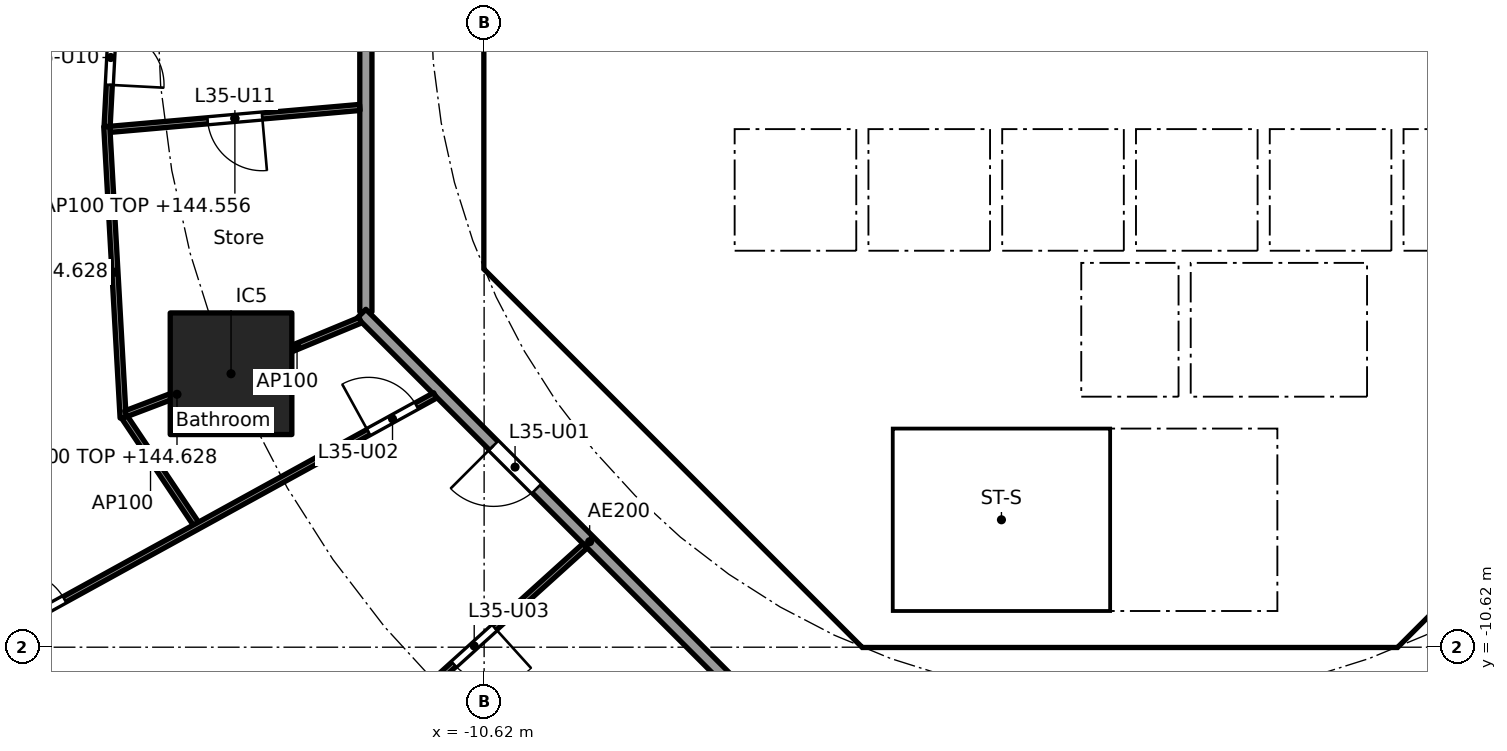
"""IFC4 building model, lengths in metres.
Left out: names, types, materials, properties, quantities, classifications, styles, units other than length and angle.
Written with IfcOpenShell. Run it as: python <this file> out.ifc"""

import sys

from ifc_helpers import new_model, si_unit, direction, frame, frame_2d, origin, origin_2d, place, context, subcontext, project, spatial, polyline, rectangle, outline, extrude, element, fill, save


model = new_model("IFC4")
c1 = context("Model", 3, precision=1e-05, world=origin(), true_north=direction((0.0, 1.0)))
c2 = subcontext(c1, "Body", "Model", "MODEL_VIEW")
j1 = project(units=[si_unit("LENGTHUNIT", "METRE"), si_unit("PLANEANGLEUNIT", "RADIAN")], contexts=[c1])
p1 = place(None, origin())
s1 = spatial("IfcSite", under=j1, at=p1, CompositionType="ELEMENT")
p2 = place(p1, origin())
s2 = spatial("IfcBuilding", under=s1, at=p2, CompositionType="ELEMENT")
p3 = place(p2, frame((0.0, 0.0, 141.8)))
s3 = spatial("IfcBuildingStorey", under=s2, at=p3, CompositionType="ELEMENT", Elevation=141.8)
p4 = place(p3, frame((-14.782, -6.123, 0.0), z_axis=(0.0, 0.0, 1.0), x_axis=(1.0, 0.0, 0.0)))
e1 = element("IfcColumn", 1, at=p4, inside=s3, PredefinedType="COLUMN", context=c2, shape_type="SweptSolid", body=[
    extrude(rectangle(XDim=2.0, YDim=2.0, at=origin_2d()), origin(), (0.0, 0.0, 1.0), 3.7),
])
p5 = place(p3, frame((-10.325, 3.801, 0.0), z_axis=(0.0, 0.0, 1.0), x_axis=(0.0, -1.0, 0.0)))
e2 = element("IfcWall", 2, at=p5, inside=s3, PredefinedType="SHEAR", context=c2, shape_type="SweptSolid", body=[
    extrude(rectangle(XDim=7.602, YDim=0.6, at=frame_2d((3.801, 0.0))), origin(), (0.0, 0.0, 1.0), 3.44),
])
p6 = place(p5, frame((0.651, 0.0, 0.0)))
e3 = element("IfcOpeningElement", 3, at=p6, cuts=e2, PredefinedType="OPENING", context=c2, shape_type="SweptSolid", body=[
    extrude(rectangle(XDim=1.5, YDim=2.1, at=frame_2d((0.75, 1.05))), frame((0.0, 0.31, 0.0), z_axis=(0.0, -1.0, 0.0), x_axis=(1.0, 0.0, 0.0)), (0.0, 0.0, 1.0), 0.62),
])
p7 = place(p5, frame((5.451, 0.0, 0.0)))
e4 = element("IfcOpeningElement", 4, at=p7, cuts=e2, PredefinedType="OPENING", context=c2, shape_type="SweptSolid", body=[
    extrude(rectangle(XDim=1.5, YDim=2.1, at=frame_2d((0.75, 1.05))), frame((0.0, 0.31, 0.0), z_axis=(0.0, -1.0, 0.0), x_axis=(1.0, 0.0, 0.0)), (0.0, 0.0, 1.0), 0.62),
])
p8 = place(p3, frame((-9.988, -4.613, 0.0), z_axis=(0.0, 0.0, 1.0), x_axis=(0.707106781187, -0.707106781187, 0.0)))
e5 = element("IfcWall", 5, at=p8, inside=s3, PredefinedType="SHEAR", context=c2, shape_type="SweptSolid", body=[
    extrude(rectangle(XDim=7.602, YDim=0.6, at=frame_2d((3.801, 0.0))), origin(), (0.0, 0.0, 1.0), 3.44),
])
p9 = place(p8, frame((6.151, 0.0, 0.0)))
e6 = element("IfcOpeningElement", 6, at=p9, cuts=e5, PredefinedType="OPENING", context=c2, shape_type="SweptSolid", body=[
    extrude(rectangle(XDim=1.1, YDim=2.1, at=frame_2d((0.55, 1.05))), frame((0.0, 0.31, 0.0), z_axis=(0.0, -1.0, 0.0), x_axis=(1.0, 0.0, 0.0)), (0.0, 0.0, 1.0), 0.62),
])
p10 = place(p3, frame((4.613, -9.988, 0.0), z_axis=(0.0, 0.0, 1.0), x_axis=(0.707106781187, 0.707106781187, 0.0)))
e7 = element("IfcWall", 7, at=p10, inside=s3, PredefinedType="SHEAR", context=c2, shape_type="SweptSolid", body=[
    extrude(rectangle(XDim=7.602, YDim=0.6, at=frame_2d((3.801, 0.0))), origin(), (0.0, 0.0, 1.0), 3.44),
])
p11 = place(p10, frame((3.201, 0.0, 0.0)))
e8 = element("IfcOpeningElement", 8, at=p11, cuts=e7, PredefinedType="OPENING", context=c2, shape_type="SweptSolid", body=[
    extrude(rectangle(XDim=1.2, YDim=2.1, at=frame_2d((0.6, 1.05))), frame((0.0, 0.31, 0.0), z_axis=(0.0, -1.0, 0.0), x_axis=(1.0, 0.0, 0.0)), (0.0, 0.0, 1.0), 0.62),
])
p12 = place(p3, frame((4.0, -10.025, 0.0), z_axis=(0.0, 0.0, 1.0), x_axis=(0.0, 1.0, 0.0)))
e9 = element("IfcWall", 9, at=p12, inside=s3, PredefinedType="SOLIDWALL", context=c2, shape_type="SweptSolid", body=[
    extrude(rectangle(XDim=3.0, YDim=0.2, at=frame_2d((1.5, 0.0))), origin(), (0.0, 0.0, 1.0), 3.44),
])
p13 = place(p12, frame((0.975, 0.0, 0.0)))
e10 = element("IfcOpeningElement", 10, at=p13, cuts=e9, PredefinedType="OPENING", context=c2, shape_type="SweptSolid", body=[
    extrude(rectangle(XDim=1.1, YDim=2.1, at=frame_2d((0.55, 1.05))), frame((0.0, 0.11, 0.0), z_axis=(0.0, -1.0, 0.0), x_axis=(1.0, 0.0, 0.0)), (0.0, 0.0, 1.0), 0.22),
])
p14 = place(p3, frame((-7.0, -7.027, 0.0), z_axis=(0.0, 0.0, 1.0), x_axis=(0.0, 1.0, 0.0)))
e11 = element("IfcWall", 11, at=p14, inside=s3, PredefinedType="PARTITIONING", context=c2, shape_type="SweptSolid", body=[
    extrude(rectangle(XDim=2.927, YDim=0.15, at=frame_2d((1.463, 0.0))), origin(), (0.0, 0.0, 1.0), 3.44),
])
p15 = place(p14, frame((0.976, 0.0, 0.0)))
e12 = element("IfcOpeningElement", 12, at=p15, cuts=e11, PredefinedType="OPENING", context=c2, shape_type="SweptSolid", body=[
    extrude(rectangle(XDim=0.9, YDim=2.1, at=frame_2d((0.45, 1.05))), frame((0.0, 0.085, 0.0), z_axis=(0.0, -1.0, 0.0), x_axis=(1.0, 0.0, 0.0)), (0.0, 0.0, 1.0), 0.17),
])
p16 = place(p3, frame((4.0, -6.5, 0.0), z_axis=(0.0, 0.0, 1.0), x_axis=(0.0, 1.0, 0.0)))
e13 = element("IfcWall", 13, at=p16, inside=s3, PredefinedType="SOLIDWALL", context=c2, shape_type="SweptSolid", body=[
    extrude(rectangle(XDim=2.2, YDim=0.2, at=frame_2d((1.1, 0.0))), origin(), (0.0, 0.0, 1.0), 3.44),
])
p17 = place(p16, frame((0.55, 0.0, 0.0)))
e14 = element("IfcOpeningElement", 14, at=p17, cuts=e13, PredefinedType="OPENING", context=c2, shape_type="SweptSolid", body=[
    extrude(rectangle(XDim=1.1, YDim=2.1, at=frame_2d((0.55, 1.05))), frame((0.0, 0.11, 0.0), z_axis=(0.0, -1.0, 0.0), x_axis=(1.0, 0.0, 0.0)), (0.0, 0.0, 1.0), 0.22),
])
p18 = place(p3, frame((-4.0, -6.5, 0.0), z_axis=(0.0, 0.0, 1.0), x_axis=(0.0, 1.0, 0.0)))
e15 = element("IfcWall", 15, at=p18, inside=s3, PredefinedType="SOLIDWALL", context=c2, shape_type="SweptSolid", body=[
    extrude(rectangle(XDim=2.2, YDim=0.2, at=frame_2d((1.1, 0.0))), origin(), (0.0, 0.0, 1.0), 3.44),
])
p19 = place(p18, frame((0.65, 0.0, 0.0)))
e16 = element("IfcOpeningElement", 16, at=p19, cuts=e15, PredefinedType="OPENING", context=c2, shape_type="SweptSolid", body=[
    extrude(rectangle(XDim=0.9, YDim=2.1, at=frame_2d((0.45, 1.05))), frame((0.0, 0.11, 0.0), z_axis=(0.0, -1.0, 0.0), x_axis=(1.0, 0.0, 0.0)), (0.0, 0.0, 1.0), 0.22),
])
p20 = place(p3, frame((-6.7, -2.0, 0.0), z_axis=(0.0, 0.0, 1.0), x_axis=(1.0, 0.0, 0.0)))
e17 = element("IfcWall", 17, at=p20, inside=s3, PredefinedType="SOLIDWALL", context=c2, shape_type="SweptSolid", body=[
    extrude(rectangle(XDim=13.4, YDim=0.2, at=frame_2d((6.7, 0.0))), origin(), (0.0, 0.0, 1.0), 3.44),
])
p21 = place(p20, frame((0.65, 0.0, 0.0)))
e18 = element("IfcOpeningElement", 18, at=p21, cuts=e17, PredefinedType="OPENING", context=c2, shape_type="SweptSolid", body=[
    extrude(rectangle(XDim=1.1, YDim=2.1, at=frame_2d((0.55, 1.05))), frame((0.0, 0.11, 0.0), z_axis=(0.0, -1.0, 0.0), x_axis=(1.0, 0.0, 0.0)), (0.0, 0.0, 1.0), 0.22),
])
p22 = place(p20, frame((2.85, 0.0, 0.0)))
e19 = element("IfcOpeningElement", 19, at=p22, cuts=e17, PredefinedType="OPENING", context=c2, shape_type="SweptSolid", body=[
    extrude(rectangle(XDim=1.1, YDim=2.1, at=frame_2d((0.55, 1.05))), frame((0.0, 0.11, 0.0), z_axis=(0.0, -1.0, 0.0), x_axis=(1.0, 0.0, 0.0)), (0.0, 0.0, 1.0), 0.22),
])
p23 = place(p3, origin())
e20 = element("IfcWall", 20, at=p23, inside=s3, PredefinedType="SHEAR", context=c2, shape_type="SweptSolid", body=[
    extrude(outline(polyline([(-10.625, -3.801), (-10.025, -3.801), (-10.025, -4.152), (-9.776, -4.401), (-10.2, -4.825), (-10.625, -4.401), (-10.625, -3.801)])), origin(), (0.0, 0.0, 1.0), 3.44),
])
p24 = place(p3, origin())
e21 = element("IfcWall", 21, at=p24, inside=s3, PredefinedType="SHEAR", context=c2, shape_type="SweptSolid", body=[
    extrude(outline(polyline([(-4.152, -10.025), (4.152, -10.025), (4.401, -9.776), (4.825, -10.2), (4.401, -10.625), (-4.401, -10.625), (-4.825, -10.2), (-4.401, -9.776), (-4.152, -10.025)])), origin(), (0.0, 0.0, 1.0), 3.44),
])
p25 = place(p3, frame((-10.025, -4.0, 0.0), z_axis=(0.0, 0.0, 1.0), x_axis=(1.0, 0.0, 0.0)))
e22 = element("IfcWall", 22, at=p25, inside=s3, PredefinedType="PARTITIONING", context=c2, shape_type="SweptSolid", body=[
    extrude(rectangle(XDim=3.325, YDim=0.2, at=frame_2d((1.662, 0.0))), origin(), (0.0, 0.0, 1.0), 3.44),
])
for number, where, z_axis, x_axis in (
    (23, (-0.9, -6.5, 0.0), (0.0, 0.0, 1.0), (0.0, 1.0, 0.0)),
    (24, (0.9, -6.5, 0.0), (0.0, 0.0, 1.0), (0.0, 1.0, 0.0)),
):
    element("IfcWall", number, at=place(p3, frame(where, z_axis=z_axis, x_axis=x_axis)), inside=s3, PredefinedType="SOLIDWALL", context=c2, shape_type="SweptSolid", body=[
        extrude(rectangle(XDim=2.2, YDim=0.2, at=frame_2d((1.1, 0.0))), origin(), (0.0, 0.0, 1.0), 3.44),
    ])
p26 = place(p3, origin())
e25 = element("IfcWall", 25, at=p26, inside=s3, PredefinedType="SOLIDWALL", context=c2, shape_type="SweptSolid", body=[
    extrude(outline(polyline([(-6.7, -2.1), (-6.5, -2.1), (-6.5, -4.1), (-4.5, -4.1), (-4.5, -2.1), (-4.3, -2.1), (-4.3, -4.1), (-2.3, -4.1), (-2.3, -2.1), (-2.1, -2.1), (-2.1, -4.1), (-0.1, -4.1), (-0.1, -2.1), (0.1, -2.1), (0.1, -4.1), (2.1, -4.1), (2.1, -2.1), (2.3, -2.1), (2.3, -4.1), (4.3, -4.1), (4.3, -2.1), (4.5, -2.1), (4.5, -4.1), (6.5, -4.1), (6.5, -2.1), (6.7, -2.1), (6.7, -4.3), (-6.7, -4.3), (-6.7, -2.1)])), origin(), (0.0, 0.0, 1.0), 3.44),
])
p27 = place(p3, origin())
e26 = element("IfcWall", 26, at=p27, inside=s3, PredefinedType="SOLIDWALL", context=c2, shape_type="SweptSolid", body=[
    extrude(outline(polyline([(-3.9, -10.025), (-4.1, -10.025), (-4.1, -7.025), (-3.9, -7.025), (-3.9, -10.025)])), origin(), (0.0, 0.0, 1.0), 3.44),
])
p28 = place(p3, origin())
e27 = element("IfcWall", 27, at=p28, inside=s3, PredefinedType="SOLIDWALL", context=c2, shape_type="SweptSolid", body=[
    extrude(outline(polyline([(4.1, -7.025), (-4.1, -7.025), (-4.1, -6.5), (4.1, -6.5), (4.1, -7.025)])), origin(), (0.0, 0.0, 1.0), 3.44),
])
p29 = place(p3, frame((-12.565, 5.304, 0.0), z_axis=(0.0, 0.0, 1.0), x_axis=(0.0, -1.0, 0.0)))
e28 = element("IfcWall", 28, at=p29, inside=s3, PredefinedType="PARTITIONING", context=c2, shape_type="SweptSolid", body=[
    extrude(rectangle(XDim=10.409, YDim=0.2, at=frame_2d((5.205, 0.0))), origin(), (0.0, 0.0, 1.0), 3.44),
])
p30 = place(p3, frame((-12.635, -5.134, 0.0), z_axis=(0.0, 0.0, 1.0), x_axis=(0.707106781187, -0.707106781187, 0.0)))
e29 = element("IfcWall", 29, at=p30, inside=s3, PredefinedType="PARTITIONING", context=c2, shape_type="SweptSolid", body=[
    extrude(rectangle(XDim=10.609, YDim=0.2, at=frame_2d((5.305, 0.0))), origin(), (0.0, 0.0, 1.0), 3.44),
])
p31 = place(p30, frame((3.07, 0.0, 0.0)))
e30 = element("IfcOpeningElement", 30, at=p31, cuts=e29, PredefinedType="OPENING", context=c2, shape_type="SweptSolid", body=[
    extrude(rectangle(XDim=1.0, YDim=2.1, at=frame_2d((0.5, 1.05))), frame((0.0, 0.11, 0.0), z_axis=(0.0, -1.0, 0.0), x_axis=(1.0, 0.0, 0.0)), (0.0, 0.0, 1.0), 0.22),
])
p32 = place(p3, frame((-16.576, 2.585, 0.0), z_axis=(0.0, 0.0, 1.0), x_axis=(-0.052509224895, -0.998620439056, 0.0)))
e31 = element("IfcWall", 31, at=p32, inside=s3, PredefinedType="PARTITIONING", context=c2, shape_type="SweptSolid", body=[
    extrude(rectangle(XDim=4.649, YDim=0.1, at=frame_2d((2.325, 0.0))), origin(), (0.0, 0.0, 1.0), 2.828),
])
p33 = place(p32, frame((3.062, 0.0, 0.0)))
e32 = element("IfcOpeningElement", 32, at=p33, cuts=e31, PredefinedType="OPENING", context=c2, shape_type="SweptSolid", body=[
    extrude(rectangle(XDim=0.9, YDim=2.1, at=frame_2d((0.45, 1.05))), frame((0.0, 0.06, 0.0), z_axis=(0.0, -1.0, 0.0), x_axis=(1.0, 0.0, 0.0)), (0.0, 0.0, 1.0), 0.12),
])
p34 = place(p3, frame((-12.664, -1.744, 0.0), z_axis=(0.0, 0.0, 1.0), x_axis=(-0.996181049379, -0.08731160781, 0.0)))
e33 = element("IfcWall", 33, at=p34, inside=s3, PredefinedType="PARTITIONING", context=c2, shape_type="SweptSolid", body=[
    extrude(rectangle(XDim=4.125, YDim=0.1, at=frame_2d((2.062, 0.0))), origin(), (0.0, 0.0, 1.0), 2.756),
])
p35 = place(p34, frame((1.612, 0.0, 0.0)))
e34 = element("IfcOpeningElement", 34, at=p35, cuts=e33, PredefinedType="OPENING", context=c2, shape_type="SweptSolid", body=[
    extrude(rectangle(XDim=0.9, YDim=2.1, at=frame_2d((0.45, 1.05))), frame((0.0, 0.06, 0.0), z_axis=(0.0, -1.0, 0.0), x_axis=(1.0, 0.0, 0.0)), (0.0, 0.0, 1.0), 0.12),
])
p36 = place(p3, frame((-16.825, -2.058, 0.0), z_axis=(0.0, 0.0, 1.0), x_axis=(0.055971643802, -0.998432358796, 0.0)))
e35 = element("IfcWall", 35, at=p36, inside=s3, PredefinedType="PARTITIONING", context=c2, shape_type="SweptSolid", body=[
    extrude(rectangle(XDim=4.798, YDim=0.1, at=frame_2d((2.399, 0.0))), origin(), (0.0, 0.0, 1.0), 2.828),
])
p37 = place(p3, frame((-12.657, -5.243, 0.0), z_axis=(0.0, 0.0, 1.0), x_axis=(-0.923864733477, -0.382719158442, 0.0)))
e36 = element("IfcWall", 36, at=p37, inside=s3, PredefinedType="PARTITIONING", context=c2, shape_type="SweptSolid", body=[
    extrude(rectangle(XDim=2.25, YDim=0.1, at=frame_2d((1.125, 0.0))), origin(), (0.0, 0.0, 1.0), 3.44),
])
p38 = place(p3, frame((-14.829, -6.141, 0.0), z_axis=(0.0, 0.0, 1.0), x_axis=(-0.934704367514, -0.355426146128, 0.0)))
e37 = element("IfcWall", 37, at=p38, inside=s3, PredefinedType="PARTITIONING", context=c2, shape_type="SweptSolid", body=[
    extrude(rectangle(XDim=1.802, YDim=0.1, at=frame_2d((0.901, 0.0))), origin(), (0.0, 0.0, 1.0), 2.828),
])
p39 = place(p3, frame((-16.532, -6.84, 0.0), z_axis=(0.0, 0.0, 1.0), x_axis=(0.556994773624, -0.830515997531, 0.0)))
e38 = element("IfcWall", 38, at=p39, inside=s3, PredefinedType="PARTITIONING", context=c2, shape_type="SweptSolid", body=[
    extrude(rectangle(XDim=2.183, YDim=0.1, at=frame_2d((1.092, 0.0))), origin(), (0.0, 0.0, 1.0), 3.44),
])
p40 = place(p3, frame((-11.426, -6.479, 0.0), z_axis=(0.0, 0.0, 1.0), x_axis=(-0.876110392495, -0.482110547657, 0.0)))
e39 = element("IfcWall", 39, at=p40, inside=s3, PredefinedType="PARTITIONING", context=c2, shape_type="SweptSolid", body=[
    extrude(rectangle(XDim=16.955, YDim=0.1, at=frame_2d((8.478, 0.0))), origin(), (0.0, 0.0, 1.0), 2.756),
])
p41 = place(p40, frame((0.35, 0.0, 0.0)))
e40 = element("IfcOpeningElement", 40, at=p41, cuts=e39, PredefinedType="OPENING", context=c2, shape_type="SweptSolid", body=[
    extrude(rectangle(XDim=0.9, YDim=2.1, at=frame_2d((0.45, 1.05))), frame((0.0, 0.06, 0.0), z_axis=(0.0, -1.0, 0.0), x_axis=(1.0, 0.0, 0.0)), (0.0, 0.0, 1.0), 0.12),
])
p42 = place(p40, frame((6.957, 0.0, 0.0)))
e41 = element("IfcOpeningElement", 41, at=p42, cuts=e39, PredefinedType="OPENING", context=c2, shape_type="SweptSolid", body=[
    extrude(rectangle(XDim=0.9, YDim=2.1, at=frame_2d((0.45, 1.05))), frame((0.0, 0.06, 0.0), z_axis=(0.0, -1.0, 0.0), x_axis=(1.0, 0.0, 0.0)), (0.0, 0.0, 1.0), 0.12),
])
p43 = place(p3, frame((-8.959, -8.952, 0.0), z_axis=(0.0, 0.0, 1.0), x_axis=(-0.741982736283, -0.670418987692, 0.0)))
e42 = element("IfcWall", 42, at=p43, inside=s3, PredefinedType="PARTITIONING", context=c2, shape_type="SweptSolid", body=[
    extrude(rectangle(XDim=11.371, YDim=0.1, at=frame_2d((5.685, 0.0))), origin(), (0.0, 0.0, 1.0), 2.756),
])
p44 = place(p43, frame((2.009, 0.0, 0.0)))
e43 = element("IfcOpeningElement", 43, at=p44, cuts=e42, PredefinedType="OPENING", context=c2, shape_type="SweptSolid", body=[
    extrude(rectangle(XDim=0.9, YDim=2.1, at=frame_2d((0.45, 1.05))), frame((0.0, 0.06, 0.0), z_axis=(0.0, -1.0, 0.0), x_axis=(1.0, 0.0, 0.0)), (0.0, 0.0, 1.0), 0.12),
])
p45 = place(p43, frame((7.694, 0.0, 0.0)))
e44 = element("IfcOpeningElement", 44, at=p45, cuts=e42, PredefinedType="OPENING", context=c2, shape_type="SweptSolid", body=[
    extrude(rectangle(XDim=0.9, YDim=2.1, at=frame_2d((0.45, 1.05))), frame((0.0, 0.06, 0.0), z_axis=(0.0, -1.0, 0.0), x_axis=(1.0, 0.0, 0.0)), (0.0, 0.0, 1.0), 0.12),
])
p46 = place(p21, origin())
e45 = element("IfcDoor", 45, at=p46, inside=s3, OperationType="DOUBLE_DOOR_SLIDING", PredefinedType="DOOR", context=c2, shape_type="SweptSolid", body=[
    extrude(rectangle(XDim=1.1, YDim=2.1, at=frame_2d((0.55, 1.05))), frame((0.0, 0.025, 0.0), z_axis=(0.0, -1.0, 0.0), x_axis=(1.0, 0.0, 0.0)), (0.0, 0.0, 1.0), 0.05),
])
fill(e18, e45)
p47 = place(p22, origin())
e46 = element("IfcDoor", 46, at=p47, inside=s3, OperationType="DOUBLE_DOOR_SLIDING", PredefinedType="DOOR", context=c2, shape_type="SweptSolid", body=[
    extrude(rectangle(XDim=1.1, YDim=2.1, at=frame_2d((0.55, 1.05))), frame((0.0, 0.025, 0.0), z_axis=(0.0, -1.0, 0.0), x_axis=(1.0, 0.0, 0.0)), (0.0, 0.0, 1.0), 0.05),
])
fill(e19, e46)
p48 = place(p17, origin())
e47 = element("IfcDoor", 47, at=p48, inside=s3, OperationType="DOUBLE_DOOR_SLIDING", PredefinedType="DOOR", context=c2, shape_type="SweptSolid", body=[
    extrude(rectangle(XDim=1.1, YDim=2.1, at=frame_2d((0.55, 1.05))), frame((0.0, 0.025, 0.0), z_axis=(0.0, -1.0, 0.0), x_axis=(1.0, 0.0, 0.0)), (0.0, 0.0, 1.0), 0.05),
])
fill(e14, e47)
p49 = place(p13, origin())
e48 = element("IfcDoor", 48, at=p49, inside=s3, OperationType="SINGLE_SWING_RIGHT", PredefinedType="DOOR", context=c2, shape_type="SweptSolid", body=[
    extrude(rectangle(XDim=1.1, YDim=2.1, at=frame_2d((0.55, 1.05))), frame((0.0, 0.025, 0.0), z_axis=(0.0, -1.0, 0.0), x_axis=(1.0, 0.0, 0.0)), (0.0, 0.0, 1.0), 0.05),
])
fill(e10, e48)
p50 = place(p15, origin())
e49 = element("IfcDoor", 49, at=p50, inside=s3, OperationType="SINGLE_SWING_RIGHT", PredefinedType="DOOR", context=c2, shape_type="SweptSolid", body=[
    extrude(rectangle(XDim=0.9, YDim=2.1, at=frame_2d((0.45, 1.05))), frame((0.0, 0.025, 0.0), z_axis=(0.0, -1.0, 0.0), x_axis=(1.0, 0.0, 0.0)), (0.0, 0.0, 1.0), 0.05),
])
fill(e12, e49)
p51 = place(p19, frame((0.9, 0.0, 0.0), x_axis=(-1.0, 0.0, 0.0)))
e50 = element("IfcDoor", 50, at=p51, inside=s3, OperationType="SINGLE_SWING_RIGHT", PredefinedType="DOOR", context=c2, shape_type="SweptSolid", body=[
    extrude(rectangle(XDim=0.9, YDim=2.1, at=frame_2d((0.45, 1.05))), frame((0.0, 0.025, 0.0), z_axis=(0.0, -1.0, 0.0), x_axis=(1.0, 0.0, 0.0)), (0.0, 0.0, 1.0), 0.05),
])
fill(e16, e50)
p52 = place(p7, origin())
e51 = element("IfcDoor", 51, at=p52, inside=s3, OperationType="DOUBLE_DOOR_SINGLE_SWING", PredefinedType="DOOR", context=c2, shape_type="SweptSolid", body=[
    extrude(rectangle(XDim=1.5, YDim=2.1, at=frame_2d((0.75, 1.05))), frame((0.0, 0.025, 0.0), z_axis=(0.0, -1.0, 0.0), x_axis=(1.0, 0.0, 0.0)), (0.0, 0.0, 1.0), 0.05),
])
fill(e4, e51)
p53 = place(p9, origin())
e52 = element("IfcDoor", 52, at=p53, inside=s3, OperationType="SINGLE_SWING_RIGHT", PredefinedType="DOOR", context=c2, shape_type="SweptSolid", body=[
    extrude(rectangle(XDim=1.1, YDim=2.1, at=frame_2d((0.55, 1.05))), frame((0.0, 0.025, 0.0), z_axis=(0.0, -1.0, 0.0), x_axis=(1.0, 0.0, 0.0)), (0.0, 0.0, 1.0), 0.05),
])
fill(e6, e52)
p54 = place(p31, frame((1.0, 0.0, 0.0), x_axis=(-1.0, 0.0, 0.0)))
e53 = element("IfcDoor", 53, at=p54, inside=s3, OperationType="SINGLE_SWING_RIGHT", PredefinedType="DOOR", context=c2, shape_type="SweptSolid", body=[
    extrude(rectangle(XDim=1.0, YDim=2.1, at=frame_2d((0.5, 1.05))), frame((0.0, 0.025, 0.0), z_axis=(0.0, -1.0, 0.0), x_axis=(1.0, 0.0, 0.0)), (0.0, 0.0, 1.0), 0.05),
])
fill(e30, e53)
p55 = place(p41, frame((0.9, 0.0, 0.0), x_axis=(-1.0, 0.0, 0.0)))
e54 = element("IfcDoor", 54, at=p55, inside=s3, OperationType="SINGLE_SWING_LEFT", PredefinedType="DOOR", context=c2, shape_type="SweptSolid", body=[
    extrude(rectangle(XDim=0.9, YDim=2.1, at=frame_2d((0.45, 1.05))), frame((0.0, 0.025, 0.0), z_axis=(0.0, -1.0, 0.0), x_axis=(1.0, 0.0, 0.0)), (0.0, 0.0, 1.0), 0.05),
])
fill(e40, e54)
p56 = place(p44, origin())
e55 = element("IfcDoor", 55, at=p56, inside=s3, OperationType="SINGLE_SWING_LEFT", PredefinedType="DOOR", context=c2, shape_type="SweptSolid", body=[
    extrude(rectangle(XDim=0.9, YDim=2.1, at=frame_2d((0.45, 1.05))), frame((0.0, 0.025, 0.0), z_axis=(0.0, -1.0, 0.0), x_axis=(1.0, 0.0, 0.0)), (0.0, 0.0, 1.0), 0.05),
])
fill(e43, e55)
p57 = place(p42, frame((0.9, 0.0, 0.0), x_axis=(-1.0, 0.0, 0.0)))
e56 = element("IfcDoor", 56, at=p57, inside=s3, OperationType="SINGLE_SWING_LEFT", PredefinedType="DOOR", context=c2, shape_type="SweptSolid", body=[
    extrude(rectangle(XDim=0.9, YDim=2.1, at=frame_2d((0.45, 1.05))), frame((0.0, 0.025, 0.0), z_axis=(0.0, -1.0, 0.0), x_axis=(1.0, 0.0, 0.0)), (0.0, 0.0, 1.0), 0.05),
])
fill(e41, e56)
p58 = place(p33, origin())
e57 = element("IfcDoor", 57, at=p58, inside=s3, OperationType="SINGLE_SWING_RIGHT", PredefinedType="DOOR", context=c2, shape_type="SweptSolid", body=[
    extrude(rectangle(XDim=0.9, YDim=2.1, at=frame_2d((0.45, 1.05))), frame((0.0, 0.025, 0.0), z_axis=(0.0, -1.0, 0.0), x_axis=(1.0, 0.0, 0.0)), (0.0, 0.0, 1.0), 0.05),
])
fill(e32, e57)
p59 = place(p35, origin())
e58 = element("IfcDoor", 58, at=p59, inside=s3, OperationType="SINGLE_SWING_LEFT", PredefinedType="DOOR", context=c2, shape_type="SweptSolid", body=[
    extrude(rectangle(XDim=0.9, YDim=2.1, at=frame_2d((0.45, 1.05))), frame((0.0, 0.025, 0.0), z_axis=(0.0, -1.0, 0.0), x_axis=(1.0, 0.0, 0.0)), (0.0, 0.0, 1.0), 0.05),
])
fill(e34, e58)
save(model, sys.argv[1])
